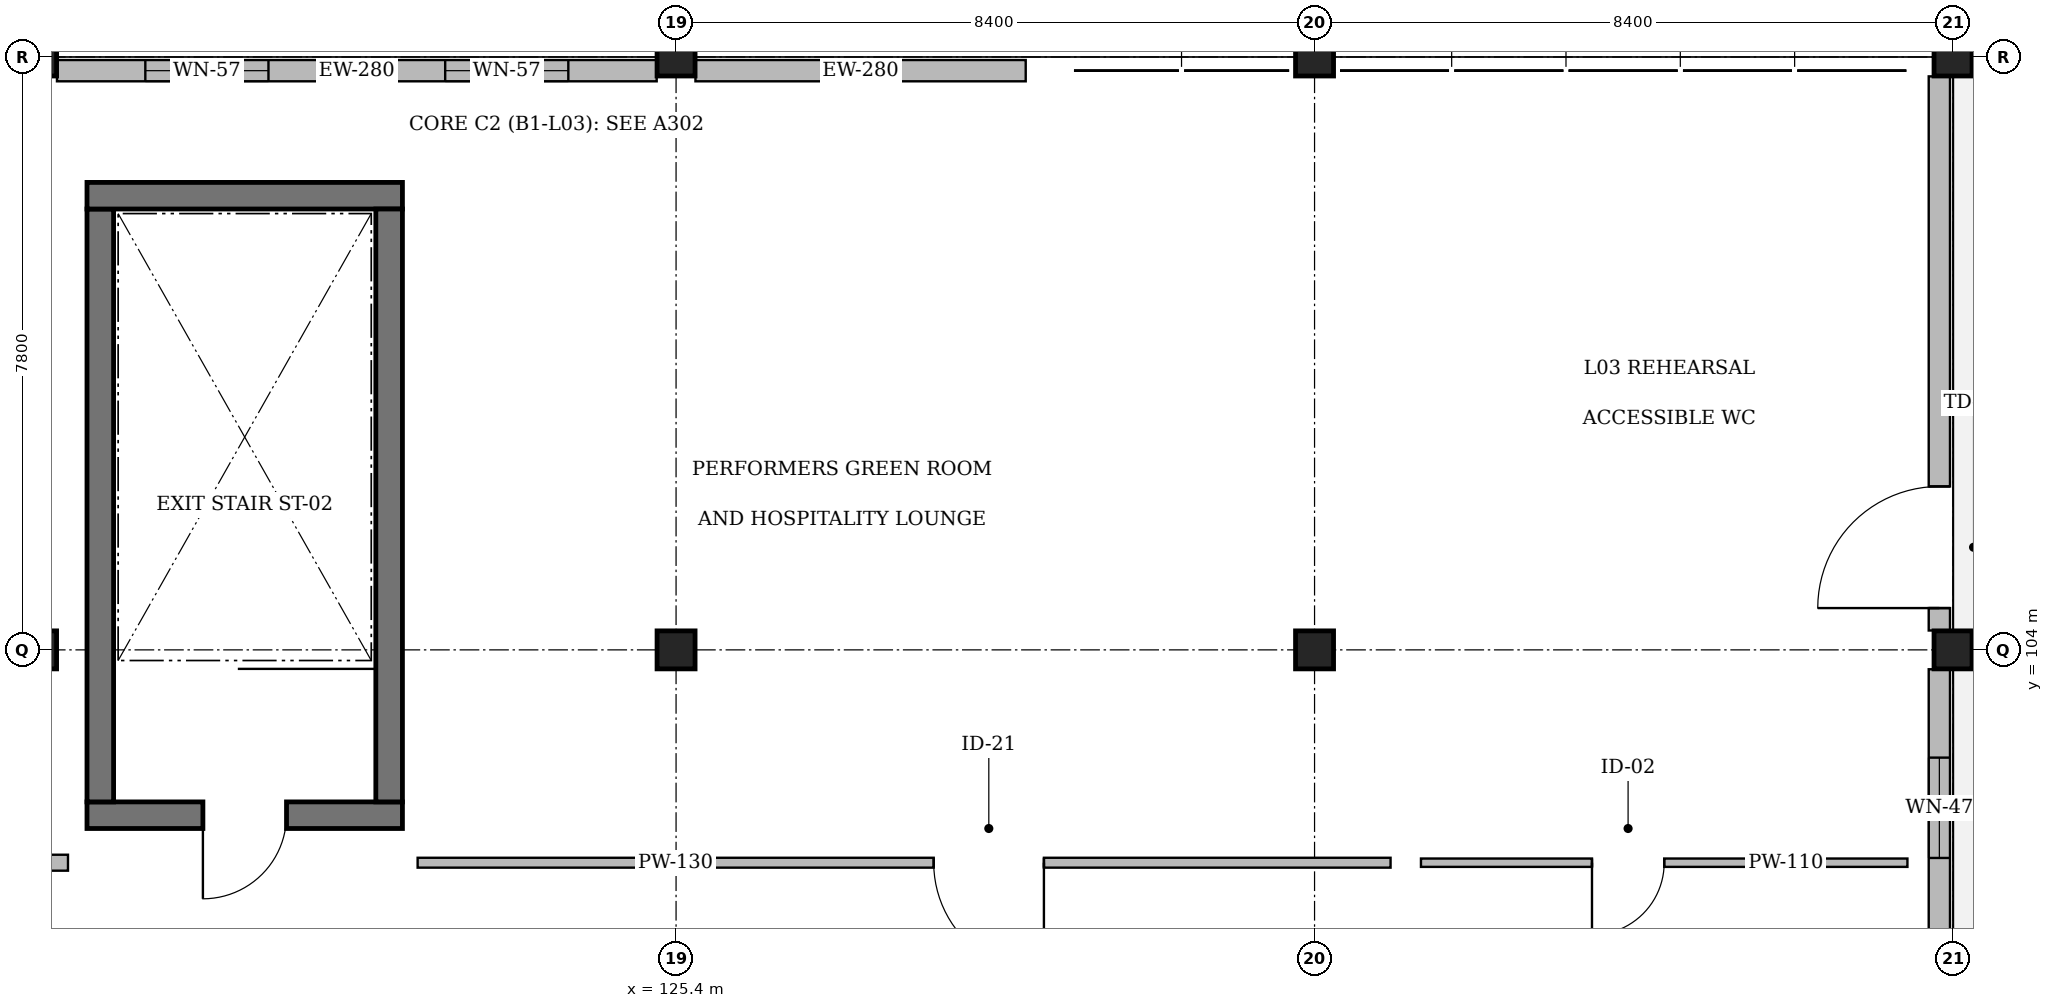
"""IFC4 building model, lengths in metres.
Left out: names, types, materials, properties, quantities, classifications, styles, units other than length and angle.
Written with IfcOpenShell. Run it as: python <this file> out.ifc"""

import sys

from ifc_helpers import new_model, si_unit, direction, frame, frame_2d, origin, origin_2d, place, context, subcontext, project, spatial, rectangle, extrude, element, fill, save


model = new_model("IFC4")
c1 = context("Model", 3, precision=1e-05, world=origin(), true_north=direction((0.0, 1.0)))
c2 = subcontext(c1, "Body", "Model", "MODEL_VIEW")
j1 = project(units=[si_unit("LENGTHUNIT", "METRE"), si_unit("PLANEANGLEUNIT", "RADIAN")], contexts=[c1])
p1 = place(None, origin())
s1 = spatial("IfcSite", under=j1, at=p1, CompositionType="ELEMENT")
p2 = place(p1, origin())
s2 = spatial("IfcBuilding", under=s1, at=p2, CompositionType="ELEMENT")
p3 = place(p2, frame((0.0, 0.0, 13.2)))
s3 = spatial("IfcBuildingStorey", under=s2, at=p3, CompositionType="ELEMENT", Elevation=13.2)
for number, where, z_axis, x_axis in (
    (1, (117.0, 104.0, 0.0), (0.0, 0.0, 1.0), (1.0, 0.0, 0.0)),
    (2, (117.0, 111.8, 0.0), (0.0, 0.0, 1.0), (1.0, 0.0, 0.0)),
    (3, (125.4, 104.0, 0.0), (0.0, 0.0, 1.0), (1.0, 0.0, 0.0)),
    (4, (125.4, 111.8, 0.0), (0.0, 0.0, 1.0), (1.0, 0.0, 0.0)),
    (5, (133.8, 104.0, 0.0), (0.0, 0.0, 1.0), (1.0, 0.0, 0.0)),
    (6, (133.8, 111.8, 0.0), (0.0, 0.0, 1.0), (1.0, 0.0, 0.0)),
    (7, (142.2, 104.0, 0.0), (0.0, 0.0, 1.0), (1.0, 0.0, 0.0)),
    (8, (142.2, 111.8, 0.0), (0.0, 0.0, 1.0), (1.0, 0.0, 0.0)),
):
    element("IfcColumn", number, at=place(p3, frame(where, z_axis=z_axis, x_axis=x_axis)), inside=s3, PredefinedType="COLUMN", context=c2, shape_type="SweptSolid", body=[
        extrude(rectangle(XDim=0.5, YDim=0.5, at=origin_2d()), origin(), (0.0, 0.0, 1.0), 3.71),
    ])
p4 = place(p3, frame((121.8, 101.825, 0.0), z_axis=(0.0, 0.0, 1.0), x_axis=(-1.0, 0.0, 0.0)))
e9 = element("IfcWall", 9, at=p4, inside=s3, PredefinedType="SOLIDWALL", context=c2, shape_type="SweptSolid", body=[
    extrude(rectangle(XDim=4.15, YDim=0.35, at=frame_2d((2.075, 0.0))), origin(), (0.0, 0.0, 1.0), 3.6),
])
p5 = place(p4, frame((1.525, 0.0, 0.0)))
e10 = element("IfcOpeningElement", 10, at=p5, cuts=e9, PredefinedType="OPENING", context=c2, shape_type="SweptSolid", body=[
    extrude(rectangle(XDim=1.1, YDim=2.15, at=frame_2d((0.55, 1.075))), frame((0.0, 0.195, 0.0), z_axis=(0.0, -1.0, 0.0), x_axis=(1.0, 0.0, 0.0)), (0.0, 0.0, 1.0), 0.39),
])
p6 = place(p3, frame((117.825, 102.0, 0.0), z_axis=(0.0, 0.0, 1.0), x_axis=(0.0, 1.0, 0.0)))
e11 = element("IfcWall", 11, at=p6, inside=s3, PredefinedType="SOLIDWALL", context=c2, shape_type="SweptSolid", body=[
    extrude(rectangle(XDim=7.8, YDim=0.35, at=frame_2d((3.9, 0.0))), origin(), (0.0, 0.0, 1.0), 3.6),
])
p7 = place(p3, frame((117.65, 109.975, 0.0), z_axis=(0.0, 0.0, 1.0), x_axis=(1.0, 0.0, 0.0)))
e12 = element("IfcWall", 12, at=p7, inside=s3, PredefinedType="SOLIDWALL", context=c2, shape_type="SweptSolid", body=[
    extrude(rectangle(XDim=4.15, YDim=0.35, at=frame_2d((2.075, 0.0))), origin(), (0.0, 0.0, 1.0), 3.6),
])
p8 = place(p3, frame((121.625, 109.8, 0.0), z_axis=(0.0, 0.0, 1.0), x_axis=(0.0, -1.0, 0.0)))
e13 = element("IfcWall", 13, at=p8, inside=s3, PredefinedType="SOLIDWALL", context=c2, shape_type="SweptSolid", body=[
    extrude(rectangle(XDim=7.8, YDim=0.35, at=frame_2d((3.9, 0.0))), origin(), (0.0, 0.0, 1.0), 3.6),
])
p9 = place(p3, frame((117.255, 111.62, 0.0), z_axis=(0.0, 0.0, 1.0), x_axis=(1.0, 0.0, 0.0)))
e14 = element("IfcWall", 14, at=p9, inside=s3, PredefinedType="SOLIDWALL", context=c2, shape_type="SweptSolid", body=[
    extrude(rectangle(XDim=7.89, YDim=0.28, at=frame_2d((3.945, 0.0))), origin(), (0.0, 0.0, 1.0), 2.993),
])
p10 = place(p9, frame((1.163, 0.0, 0.95)))
e15 = element("IfcOpeningElement", 15, at=p10, cuts=e14, PredefinedType="OPENING", context=c2, shape_type="SweptSolid", body=[
    extrude(rectangle(XDim=1.62, YDim=1.75, at=frame_2d((0.81, 0.875))), frame((0.0, 0.16, 0.0), z_axis=(0.0, -1.0, 0.0), x_axis=(1.0, 0.0, 0.0)), (0.0, 0.0, 1.0), 0.32),
])
p11 = place(p9, frame((5.107, 0.0, 0.95)))
e16 = element("IfcOpeningElement", 16, at=p11, cuts=e14, PredefinedType="OPENING", context=c2, shape_type="SweptSolid", body=[
    extrude(rectangle(XDim=1.62, YDim=1.75, at=frame_2d((0.81, 0.875))), frame((0.0, 0.16, 0.0), z_axis=(0.0, -1.0, 0.0), x_axis=(1.0, 0.0, 0.0)), (0.0, 0.0, 1.0), 0.32),
])
p12 = place(p3, frame((125.655, 111.62, 0.0), z_axis=(0.0, 0.0, 1.0), x_axis=(1.0, 0.0, 0.0)))
e17 = element("IfcWall", 17, at=p12, inside=s3, PredefinedType="SOLIDWALL", context=c2, shape_type="SweptSolid", body=[
    extrude(rectangle(XDim=4.345, YDim=0.28, at=frame_2d((2.172, 0.0))), origin(), (0.0, 0.0, 1.0), 2.993),
])
p13 = place(p3, frame((142.02, 96.455, 0.0), z_axis=(0.0, 0.0, 1.0), x_axis=(0.0, 1.0, 0.0)))
e18 = element("IfcWall", 18, at=p13, inside=s3, PredefinedType="SOLIDWALL", context=c2, shape_type="SweptSolid", body=[
    extrude(rectangle(XDim=7.29, YDim=0.28, at=frame_2d((3.645, 0.0))), origin(), (0.0, 0.0, 1.0), 3.283),
])
p14 = place(p13, frame((1.163, 0.0, 0.95)))
e19 = element("IfcOpeningElement", 19, at=p14, cuts=e18, PredefinedType="OPENING", context=c2, shape_type="SweptSolid", body=[
    extrude(rectangle(XDim=1.32, YDim=1.65, at=frame_2d((0.66, 0.825))), frame((0.0, 0.16, 0.0), z_axis=(0.0, -1.0, 0.0), x_axis=(1.0, 0.0, 0.0)), (0.0, 0.0, 1.0), 0.32),
])
p15 = place(p13, frame((4.808, 0.0, 0.95)))
e20 = element("IfcOpeningElement", 20, at=p15, cuts=e18, PredefinedType="OPENING", context=c2, shape_type="SweptSolid", body=[
    extrude(rectangle(XDim=1.32, YDim=1.65, at=frame_2d((0.66, 0.825))), frame((0.0, 0.16, 0.0), z_axis=(0.0, -1.0, 0.0), x_axis=(1.0, 0.0, 0.0)), (0.0, 0.0, 1.0), 0.32),
])
p16 = place(p3, frame((142.02, 104.255, 0.0), z_axis=(0.0, 0.0, 1.0), x_axis=(0.0, 1.0, 0.0)))
e21 = element("IfcWall", 21, at=p16, inside=s3, PredefinedType="SOLIDWALL", context=c2, shape_type="SweptSolid", body=[
    extrude(rectangle(XDim=7.29, YDim=0.28, at=frame_2d((3.645, 0.0))), origin(), (0.0, 0.0, 1.0), 3.283),
])
p17 = place(p16, frame((0.295, 0.0, 0.0)))
e22 = element("IfcOpeningElement", 22, at=p17, cuts=e21, PredefinedType="OPENING", context=c2, shape_type="SweptSolid", body=[
    extrude(rectangle(XDim=1.6, YDim=2.2, at=frame_2d((0.8, 1.1))), frame((0.0, 0.16, 0.0), z_axis=(0.0, -1.0, 0.0), x_axis=(1.0, 0.0, 0.0)), (0.0, 0.0, 1.0), 0.32),
])
p18 = place(p3, frame((117.4, 101.2, 0.0), z_axis=(0.0, 0.0, 1.0), x_axis=(-1.0, 0.0, 0.0)))
e23 = element("IfcWall", 23, at=p18, inside=s3, PredefinedType="PARTITIONING", context=c2, shape_type="SweptSolid", body=[
    extrude(rectangle(XDim=14.4, YDim=0.21, at=frame_2d((7.2, 0.0))), origin(), (0.0, 0.0, 1.0), 3.66),
])
p19 = place(p18, frame((3.066, 0.0, 0.0)))
e24 = element("IfcOpeningElement", 24, at=p19, cuts=e23, PredefinedType="OPENING", context=c2, shape_type="SweptSolid", body=[
    extrude(rectangle(XDim=1.85, YDim=2.35, at=frame_2d((0.925, 1.175))), frame((0.0, 0.125, 0.0), z_axis=(0.0, -1.0, 0.0), x_axis=(1.0, 0.0, 0.0)), (0.0, 0.0, 1.0), 0.25),
])
p20 = place(p3, frame((134.8, 101.2, 0.0), z_axis=(0.0, 0.0, 1.0), x_axis=(-1.0, 0.0, 0.0)))
e25 = element("IfcWall", 25, at=p20, inside=s3, PredefinedType="PARTITIONING", context=c2, shape_type="SweptSolid", body=[
    extrude(rectangle(XDim=12.8, YDim=0.13, at=frame_2d((6.4, 0.0))), origin(), (0.0, 0.0, 1.0), 3.66),
])
p21 = place(p20, frame((4.561, 0.0, 0.0)))
e26 = element("IfcOpeningElement", 26, at=p21, cuts=e25, PredefinedType="OPENING", context=c2, shape_type="SweptSolid", body=[
    extrude(rectangle(XDim=1.45, YDim=2.2, at=frame_2d((0.725, 1.1))), frame((0.0, 0.085, 0.0), z_axis=(0.0, -1.0, 0.0), x_axis=(1.0, 0.0, 0.0)), (0.0, 0.0, 1.0), 0.17),
])
p22 = place(p3, frame((141.6, 101.2, 0.0), z_axis=(0.0, 0.0, 1.0), x_axis=(-1.0, 0.0, 0.0)))
e27 = element("IfcWall", 27, at=p22, inside=s3, PredefinedType="PARTITIONING", context=c2, shape_type="SweptSolid", body=[
    extrude(rectangle(XDim=6.4, YDim=0.11, at=frame_2d((3.2, 0.0))), origin(), (0.0, 0.0, 1.0), 3.66),
])
p23 = place(p22, frame((3.2, 0.0, 0.0)))
e28 = element("IfcOpeningElement", 28, at=p23, cuts=e27, PredefinedType="OPENING", context=c2, shape_type="SweptSolid", body=[
    extrude(rectangle(XDim=0.95, YDim=2.1, at=frame_2d((0.475, 1.05))), frame((0.0, 0.075, 0.0), z_axis=(0.0, -1.0, 0.0), x_axis=(1.0, 0.0, 0.0)), (0.0, 0.0, 1.0), 0.15),
])
p24 = place(p5, origin())
e29 = element("IfcDoor", 29, at=p24, inside=s3, OperationType="SINGLE_SWING_RIGHT", PredefinedType="DOOR", context=c2, shape_type="SweptSolid", body=[
    extrude(rectangle(XDim=1.1, YDim=2.15, at=frame_2d((0.55, 1.075))), frame((0.0, 0.025, 0.0), z_axis=(0.0, -1.0, 0.0), x_axis=(1.0, 0.0, 0.0)), (0.0, 0.0, 1.0), 0.05),
])
fill(e10, e29)
p25 = place(p10, origin())
e30 = element("IfcWindow", 30, at=p25, inside=s3, PartitioningType="SINGLE_PANEL", PredefinedType="WINDOW", context=c2, shape_type="SweptSolid", body=[
    extrude(rectangle(XDim=1.62, YDim=1.75, at=frame_2d((0.81, 0.875))), frame((0.0, 0.03, 0.0), z_axis=(0.0, -1.0, 0.0), x_axis=(1.0, 0.0, 0.0)), (0.0, 0.0, 1.0), 0.06),
])
fill(e15, e30)
p26 = place(p11, origin())
e31 = element("IfcWindow", 31, at=p26, inside=s3, PartitioningType="SINGLE_PANEL", PredefinedType="WINDOW", context=c2, shape_type="SweptSolid", body=[
    extrude(rectangle(XDim=1.62, YDim=1.75, at=frame_2d((0.81, 0.875))), frame((0.0, 0.03, 0.0), z_axis=(0.0, -1.0, 0.0), x_axis=(1.0, 0.0, 0.0)), (0.0, 0.0, 1.0), 0.06),
])
fill(e16, e31)
p27 = place(p15, origin())
e32 = element("IfcWindow", 32, at=p27, inside=s3, PartitioningType="SINGLE_PANEL", PredefinedType="WINDOW", context=c2, shape_type="SweptSolid", body=[
    extrude(rectangle(XDim=1.32, YDim=1.65, at=frame_2d((0.66, 0.825))), frame((0.0, 0.03, 0.0), z_axis=(0.0, -1.0, 0.0), x_axis=(1.0, 0.0, 0.0)), (0.0, 0.0, 1.0), 0.06),
])
fill(e20, e32)
p28 = place(p17, origin())
e33 = element("IfcDoor", 33, at=p28, inside=s3, OperationType="SINGLE_SWING_LEFT", PredefinedType="DOOR", context=c2, shape_type="SweptSolid", body=[
    extrude(rectangle(XDim=1.6, YDim=2.2, at=frame_2d((0.8, 1.1))), frame((0.0, 0.025, 0.0), z_axis=(0.0, -1.0, 0.0), x_axis=(1.0, 0.0, 0.0)), (0.0, 0.0, 1.0), 0.05),
])
fill(e22, e33)
p29 = place(p21, origin())
e34 = element("IfcDoor", 34, at=p29, inside=s3, OperationType="DOUBLE_DOOR_SINGLE_SWING", PredefinedType="DOOR", context=c2, shape_type="SweptSolid", body=[
    extrude(rectangle(XDim=1.45, YDim=2.2, at=frame_2d((0.725, 1.1))), frame((0.0, 0.025, 0.0), z_axis=(0.0, -1.0, 0.0), x_axis=(1.0, 0.0, 0.0)), (0.0, 0.0, 1.0), 0.05),
])
fill(e26, e34)
p30 = place(p23, origin())
e35 = element("IfcDoor", 35, at=p30, inside=s3, OperationType="SINGLE_SWING_RIGHT", PredefinedType="DOOR", context=c2, shape_type="SweptSolid", body=[
    extrude(rectangle(XDim=0.95, YDim=2.1, at=frame_2d((0.475, 1.05))), frame((0.0, 0.025, 0.0), z_axis=(0.0, -1.0, 0.0), x_axis=(1.0, 0.0, 0.0)), (0.0, 0.0, 1.0), 0.05),
])
fill(e28, e35)
save(model, sys.argv[1])
